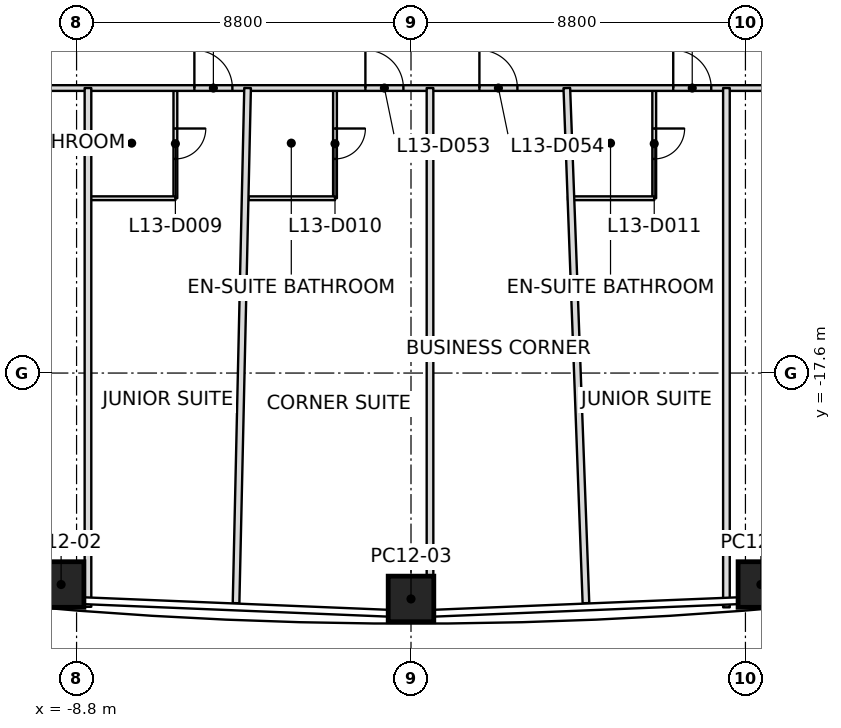
"""IFC4 building model, lengths in metres.
Left out: names, types, materials, properties, quantities, classifications, styles, units other than length and angle.
Written with IfcOpenShell. Run it as: python <this file> out.ifc"""

import sys

from ifc_helpers import new_model, si_unit, direction, frame, frame_2d, origin, origin_2d, place, context, subcontext, project, spatial, rectangle, extrude, clip, halfspace, element, fill, save


model = new_model("IFC4")
c1 = context("Model", 3, precision=1e-05, world=origin(), true_north=direction((0.0, 1.0)))
c2 = subcontext(c1, "Body", "Model", "MODEL_VIEW")
j1 = project(units=[si_unit("LENGTHUNIT", "METRE"), si_unit("PLANEANGLEUNIT", "RADIAN")], contexts=[c1])
p1 = place(None, origin())
s1 = spatial("IfcSite", under=j1, at=p1, CompositionType="ELEMENT")
p2 = place(p1, origin())
s2 = spatial("IfcBuilding", under=s1, at=p2, CompositionType="ELEMENT")
p3 = place(p2, frame((0.0, 0.0, 70.2)))
s3 = spatial("IfcBuildingStorey", under=s2, at=p3, CompositionType="ELEMENT", Elevation=70.2)
p4 = place(p3, frame((-9.207, -23.165, 0.0), z_axis=(0.009522132827, 0.151506264083, 0.988410431415), x_axis=(-0.996564259393, 0.082765659269, -0.003085862396)))
e1 = element("IfcColumn", 1, at=p4, inside=s3, PredefinedType="COLUMN", context=c2, shape_type="SweptSolid", body=[
    clip(clip(extrude(rectangle(XDim=1.2, YDim=1.2, at=origin_2d()), origin(), (0.0, 0.0, 1.0), 3.743), halfspace(frame((0.0, 0.0, 0.018)), True)), halfspace(frame((0.0, 0.0, 3.725)), False)),
])
p5 = place(p3, frame((0.0, -23.545, 0.0), z_axis=(0.0, 0.162508802785, 0.986707093832), x_axis=(1.0, 0.0, 0.0)))
e2 = element("IfcColumn", 2, at=p5, inside=s3, PredefinedType="COLUMN", context=c2, shape_type="SweptSolid", body=[
    clip(clip(extrude(rectangle(XDim=1.2, YDim=1.2, at=origin_2d()), origin(), (0.0, 0.0, 1.0), 3.75), halfspace(frame((0.0, 0.0, 0.018)), True)), halfspace(frame((0.0, 0.0, 3.731)), False)),
])
p6 = place(p3, frame((9.207, -23.165, 0.0), z_axis=(-0.009522132827, 0.151506264083, 0.988410431415), x_axis=(0.996564259393, 0.082765659269, -0.003085862396)))
e3 = element("IfcColumn", 3, at=p6, inside=s3, PredefinedType="COLUMN", context=c2, shape_type="SweptSolid", body=[
    clip(clip(extrude(rectangle(XDim=1.2, YDim=1.2, at=origin_2d()), origin(), (0.0, 0.0, 1.0), 3.743), halfspace(frame((0.0, 0.0, 0.018)), True)), halfspace(frame((0.0, 0.0, 3.725)), False)),
])
p7 = place(p3, frame((-8.5, -10.1, 0.0), z_axis=(0.0, 0.0, 1.0), x_axis=(0.0, -1.0, 0.0)))
e4 = element("IfcWall", 4, at=p7, inside=s3, PredefinedType="PARTITIONING", context=c2, shape_type="SweptSolid", body=[
    extrude(rectangle(XDim=13.651, YDim=0.175, at=frame_2d((6.825, 0.0))), origin(), (0.0, 0.0, 1.0), 2.784),
])
p8 = place(p3, frame((-4.3, -10.1, 0.0), z_axis=(0.0, 0.0, 1.0), x_axis=(-0.022381510937, -0.99974950261, 0.0)))
e5 = element("IfcWall", 5, at=p8, inside=s3, PredefinedType="PARTITIONING", context=c2, shape_type="SweptSolid", body=[
    extrude(rectangle(XDim=13.559, YDim=0.175, at=frame_2d((6.779, 0.0))), origin(), (0.0, 0.0, 1.0), 2.784),
])
p9 = place(p3, frame((0.5, -10.1, 0.0), z_axis=(0.0, 0.0, 1.0), x_axis=(0.0, -1.0, 0.0)))
e6 = element("IfcWall", 6, at=p9, inside=s3, PredefinedType="PARTITIONING", context=c2, shape_type="SweptSolid", body=[
    extrude(rectangle(XDim=13.97, YDim=0.175, at=frame_2d((6.985, 0.0))), origin(), (0.0, 0.0, 1.0), 2.784),
])
p10 = place(p3, frame((4.604, -23.656, 0.0), z_axis=(0.0, 0.0, 1.0), x_axis=(-0.03711217874, 0.999311105807, 0.0)))
e7 = element("IfcWall", 7, at=p10, inside=s3, PredefinedType="PARTITIONING", context=c2, shape_type="SweptSolid", body=[
    extrude(rectangle(XDim=13.565, YDim=0.175, at=frame_2d((6.782, 0.0))), origin(), (0.0, 0.0, 1.0), 2.784),
])
p11 = place(p3, frame((8.3, -10.1, 0.0), z_axis=(0.0, 0.0, 1.0), x_axis=(0.0, -1.0, 0.0)))
e8 = element("IfcWall", 8, at=p11, inside=s3, PredefinedType="PARTITIONING", context=c2, shape_type="SweptSolid", body=[
    extrude(rectangle(XDim=13.665, YDim=0.175, at=frame_2d((6.833, 0.0))), origin(), (0.0, 0.0, 1.0), 2.784),
])
p12 = place(p3, frame((-13.02, -10.1, 0.0), z_axis=(0.0, 0.0, 1.0), x_axis=(1.0, 0.0, 0.0)))
e9 = element("IfcWall", 9, at=p12, inside=s3, PredefinedType="PARTITIONING", context=c2, shape_type="SweptSolid", body=[
    extrude(rectangle(XDim=26.04, YDim=0.15, at=frame_2d((13.02, 0.0))), origin(), (0.0, 0.0, 1.0), 2.797),
])
p13 = place(p12, frame((7.32, 0.0, 0.0)))
e10 = element("IfcOpeningElement", 10, at=p13, cuts=e9, PredefinedType="OPENING", context=c2, shape_type="SweptSolid", body=[
    extrude(rectangle(XDim=1.0, YDim=2.1, at=frame_2d((0.5, 1.05))), frame((0.0, 0.075, 0.0), z_axis=(0.0, -1.0, 0.0), x_axis=(1.0, 0.0, 0.0)), (0.0, 0.0, 1.0), 0.15),
])
p14 = place(p12, frame((11.82, 0.0, 0.0)))
e11 = element("IfcOpeningElement", 11, at=p14, cuts=e9, PredefinedType="OPENING", context=c2, shape_type="SweptSolid", body=[
    extrude(rectangle(XDim=1.0, YDim=2.1, at=frame_2d((0.5, 1.05))), frame((0.0, 0.075, 0.0), z_axis=(0.0, -1.0, 0.0), x_axis=(1.0, 0.0, 0.0)), (0.0, 0.0, 1.0), 0.15),
])
p15 = place(p12, frame((14.82, 0.0, 0.0)))
e12 = element("IfcOpeningElement", 12, at=p15, cuts=e9, PredefinedType="OPENING", context=c2, shape_type="SweptSolid", body=[
    extrude(rectangle(XDim=1.0, YDim=2.1, at=frame_2d((0.5, 1.05))), frame((0.0, 0.075, 0.0), z_axis=(0.0, -1.0, 0.0), x_axis=(1.0, 0.0, 0.0)), (0.0, 0.0, 1.0), 0.15),
])
p16 = place(p12, frame((19.92, 0.0, 0.0)))
e13 = element("IfcOpeningElement", 13, at=p16, cuts=e9, PredefinedType="OPENING", context=c2, shape_type="SweptSolid", body=[
    extrude(rectangle(XDim=1.0, YDim=2.1, at=frame_2d((0.5, 1.05))), frame((0.0, 0.075, 0.0), z_axis=(0.0, -1.0, 0.0), x_axis=(1.0, 0.0, 0.0)), (0.0, 0.0, 1.0), 0.15),
])
p17 = place(p3, frame((-6.2, -10.13, 0.0), z_axis=(0.0, 0.0, 1.0), x_axis=(0.0, -1.0, 0.0)))
e14 = element("IfcWall", 14, at=p17, inside=s3, PredefinedType="PARTITIONING", context=c2, shape_type="SweptSolid", body=[
    extrude(rectangle(XDim=2.87, YDim=0.1, at=frame_2d((1.435, 0.0))), origin(), (0.0, 0.0, 1.0), 2.797),
])
p18 = place(p17, frame((1.035, 0.0, 0.0)))
e15 = element("IfcOpeningElement", 15, at=p18, cuts=e14, PredefinedType="OPENING", context=c2, shape_type="SweptSolid", body=[
    extrude(rectangle(XDim=0.8, YDim=2.1, at=frame_2d((0.4, 1.05))), frame((0.0, 0.05, 0.0), z_axis=(0.0, -1.0, 0.0), x_axis=(1.0, 0.0, 0.0)), (0.0, 0.0, 1.0), 0.1),
])
p19 = place(p3, frame((-6.2, -13.0, 0.0), z_axis=(0.0, 0.0, 1.0), x_axis=(-1.0, 0.0, 0.0)))
e16 = element("IfcWall", 16, at=p19, inside=s3, PredefinedType="PARTITIONING", context=c2, shape_type="SweptSolid", body=[
    extrude(rectangle(XDim=2.27, YDim=0.1, at=frame_2d((1.135, 0.0))), origin(), (0.0, 0.0, 1.0), 2.797),
])
p20 = place(p3, frame((-2.0, -10.13, 0.0), z_axis=(0.0, 0.0, 1.0), x_axis=(0.0, -1.0, 0.0)))
e17 = element("IfcWall", 17, at=p20, inside=s3, PredefinedType="PARTITIONING", context=c2, shape_type="SweptSolid", body=[
    extrude(rectangle(XDim=2.87, YDim=0.1, at=frame_2d((1.435, 0.0))), origin(), (0.0, 0.0, 1.0), 3.0),
])
p21 = place(p20, frame((1.035, 0.0, 0.0)))
e18 = element("IfcOpeningElement", 18, at=p21, cuts=e17, PredefinedType="OPENING", context=c2, shape_type="SweptSolid", body=[
    extrude(rectangle(XDim=0.8, YDim=2.1, at=frame_2d((0.4, 1.05))), frame((0.0, 0.05, 0.0), z_axis=(0.0, -1.0, 0.0), x_axis=(1.0, 0.0, 0.0)), (0.0, 0.0, 1.0), 0.1),
])
p22 = place(p3, frame((-2.0, -13.0, 0.0), z_axis=(0.0, 0.0, 1.0), x_axis=(-1.0, 0.0, 0.0)))
e19 = element("IfcWall", 19, at=p22, inside=s3, PredefinedType="PARTITIONING", context=c2, shape_type="SweptSolid", body=[
    extrude(rectangle(XDim=2.27, YDim=0.1, at=frame_2d((1.135, 0.0))), origin(), (0.0, 0.0, 1.0), 2.797),
])
p23 = place(p3, frame((6.4, -10.13, 0.0), z_axis=(0.0, 0.0, 1.0), x_axis=(0.0, -1.0, 0.0)))
e20 = element("IfcWall", 20, at=p23, inside=s3, PredefinedType="PARTITIONING", context=c2, shape_type="SweptSolid", body=[
    extrude(rectangle(XDim=2.87, YDim=0.1, at=frame_2d((1.435, 0.0))), origin(), (0.0, 0.0, 1.0), 2.797),
])
p24 = place(p23, frame((1.035, 0.0, 0.0)))
e21 = element("IfcOpeningElement", 21, at=p24, cuts=e20, PredefinedType="OPENING", context=c2, shape_type="SweptSolid", body=[
    extrude(rectangle(XDim=0.8, YDim=2.1, at=frame_2d((0.4, 1.05))), frame((0.0, 0.05, 0.0), z_axis=(0.0, -1.0, 0.0), x_axis=(1.0, 0.0, 0.0)), (0.0, 0.0, 1.0), 0.1),
])
p25 = place(p3, frame((6.4, -13.0, 0.0), z_axis=(0.0, 0.0, 1.0), x_axis=(-1.0, 0.0, 0.0)))
e22 = element("IfcWall", 22, at=p25, inside=s3, PredefinedType="PARTITIONING", context=c2, shape_type="SweptSolid", body=[
    extrude(rectangle(XDim=2.27, YDim=0.1, at=frame_2d((1.135, 0.0))), origin(), (0.0, 0.0, 1.0), 2.797),
])
p26 = place(p13, origin())
e23 = element("IfcDoor", 23, at=p26, inside=s3, OperationType="SINGLE_SWING_LEFT", PredefinedType="DOOR", context=c2, shape_type="SweptSolid", body=[
    extrude(rectangle(XDim=1.0, YDim=2.1, at=frame_2d((0.5, 1.05))), frame((0.0, 0.025, 0.0), z_axis=(0.0, -1.0, 0.0), x_axis=(1.0, 0.0, 0.0)), (0.0, 0.0, 1.0), 0.05),
])
fill(e10, e23)
p27 = place(p18, origin())
e24 = element("IfcDoor", 24, at=p27, inside=s3, OperationType="SINGLE_SWING_RIGHT", PredefinedType="DOOR", context=c2, shape_type="SweptSolid", body=[
    extrude(rectangle(XDim=0.8, YDim=2.1, at=frame_2d((0.4, 1.05))), frame((0.0, 0.025, 0.0), z_axis=(0.0, -1.0, 0.0), x_axis=(1.0, 0.0, 0.0)), (0.0, 0.0, 1.0), 0.05),
])
fill(e15, e24)
p28 = place(p14, origin())
e25 = element("IfcDoor", 25, at=p28, inside=s3, OperationType="SINGLE_SWING_LEFT", PredefinedType="DOOR", context=c2, shape_type="SweptSolid", body=[
    extrude(rectangle(XDim=1.0, YDim=2.1, at=frame_2d((0.5, 1.05))), frame((0.0, 0.025, 0.0), z_axis=(0.0, -1.0, 0.0), x_axis=(1.0, 0.0, 0.0)), (0.0, 0.0, 1.0), 0.05),
])
fill(e11, e25)
p29 = place(p21, origin())
e26 = element("IfcDoor", 26, at=p29, inside=s3, OperationType="SINGLE_SWING_LEFT", PredefinedType="DOOR", context=c2, shape_type="SweptSolid", body=[
    extrude(rectangle(XDim=0.8, YDim=2.1, at=frame_2d((0.4, 1.05))), frame((0.0, 0.025, 0.0), z_axis=(0.0, -1.0, 0.0), x_axis=(1.0, 0.0, 0.0)), (0.0, 0.0, 1.0), 0.05),
])
fill(e18, e26)
p30 = place(p15, origin())
e27 = element("IfcDoor", 27, at=p30, inside=s3, OperationType="SINGLE_SWING_LEFT", PredefinedType="DOOR", context=c2, shape_type="SweptSolid", body=[
    extrude(rectangle(XDim=1.0, YDim=2.1, at=frame_2d((0.5, 1.05))), frame((0.0, 0.025, 0.0), z_axis=(0.0, -1.0, 0.0), x_axis=(1.0, 0.0, 0.0)), (0.0, 0.0, 1.0), 0.05),
])
fill(e12, e27)
p31 = place(p16, origin())
e28 = element("IfcDoor", 28, at=p31, inside=s3, OperationType="SINGLE_SWING_LEFT", PredefinedType="DOOR", context=c2, shape_type="SweptSolid", body=[
    extrude(rectangle(XDim=1.0, YDim=2.1, at=frame_2d((0.5, 1.05))), frame((0.0, 0.025, 0.0), z_axis=(0.0, -1.0, 0.0), x_axis=(1.0, 0.0, 0.0)), (0.0, 0.0, 1.0), 0.05),
])
fill(e13, e28)
p32 = place(p24, origin())
e29 = element("IfcDoor", 29, at=p32, inside=s3, OperationType="SINGLE_SWING_LEFT", PredefinedType="DOOR", context=c2, shape_type="SweptSolid", body=[
    extrude(rectangle(XDim=0.8, YDim=2.1, at=frame_2d((0.4, 1.05))), frame((0.0, 0.025, 0.0), z_axis=(0.0, -1.0, 0.0), x_axis=(1.0, 0.0, 0.0)), (0.0, 0.0, 1.0), 0.05),
])
fill(e21, e29)
save(model, sys.argv[1])
